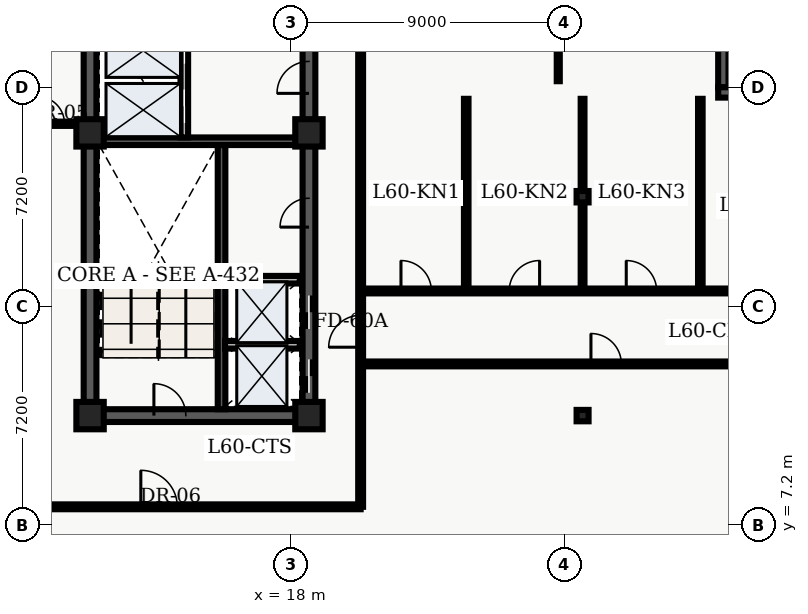
"""IFC4 building model, lengths in metres.
Left out: names, types, materials, properties, quantities, classifications, styles, units other than length and angle.
Written with IfcOpenShell. Run it as: python <this file> out.ifc"""

import sys

from ifc_helpers import new_model, entity, si_unit, converted_unit, direction, frame, origin_with_axes, origin_2d_with_axis, place, context, subcontext, project, spatial, polyline, rectangle, i_section, outline, extrude, element, fill, save


model = new_model("IFC4")
c1 = context("Model", 3, precision=1e-05, world=origin_with_axes(), true_north=direction((0.0, 1.0)))
c2 = subcontext(c1, "Body", "Model", "MODEL_VIEW")
j1 = project(units=[si_unit("LENGTHUNIT", "METRE"), converted_unit("PLANEANGLEUNIT", "DEGREE", entity("IfcPlaneAngleMeasure", 0.017), si_unit("PLANEANGLEUNIT", "RADIAN"), dimensions=[0, 0, 0, 0, 0, 0, 0])], contexts=[c1])
p1 = place(None, origin_with_axes())
s1 = spatial("IfcSite", under=j1, at=p1, CompositionType="ELEMENT")
p2 = place(p1, origin_with_axes())
s2 = spatial("IfcBuilding", under=s1, at=p2, CompositionType="ELEMENT")
p3 = place(p2, frame((0.0, 0.0, 244.2), z_axis=(0.0, 0.0, 1.0), x_axis=(1.0, 0.0, 0.0)))
s3 = spatial("IfcBuildingStorey", under=s2, at=p3, CompositionType="ELEMENT", Elevation=244.2)
p4 = place(p3, frame((11.4, 10.8, 0.0), z_axis=(0.0, 0.0, 1.0), x_axis=(0.0, 1.0, 0.0)))
e1 = element("IfcWall", 1, at=p4, inside=s3, PredefinedType="SHEAR", context=c2, shape_type="SweptSolid", body=[
    extrude(outline(polyline([(0.0, -0.21), (27.0, -0.21), (27.0, 0.21), (0.0, 0.21), (0.0, -0.21)])), origin_with_axes(), (0.0, 0.0, 1.0), 3.6),
])
p5 = place(p3, frame((11.4, 10.8, 0.0), z_axis=(0.0, 0.0, 1.0), x_axis=(1.0, 0.0, 0.0)))
e2 = element("IfcWall", 2, at=p5, inside=s3, PredefinedType="SHEAR", context=c2, shape_type="SweptSolid", body=[
    extrude(outline(polyline([(0.0, -0.21), (7.2, -0.21), (7.2, 0.21), (0.0, 0.21), (0.0, -0.21)])), origin_with_axes(), (0.0, 0.0, 1.0), 3.6),
])
p6 = place(p5, frame((2.625, 0.0, 0.0), z_axis=(0.0, 0.0, 1.0), x_axis=(1.0, 0.0, 0.0)))
e3 = element("IfcOpeningElement", 3, at=p6, cuts=e2, PredefinedType="OPENING", context=c2, shape_type="SweptSolid", body=[
    extrude(rectangle(XDim=1.05, YDim=0.44, at=origin_2d_with_axis()), origin_with_axes(), (0.0, 0.0, 1.0), 2.15),
])
p7 = place(p3, frame((18.6, 10.8, 0.0), z_axis=(0.0, 0.0, 1.0), x_axis=(0.0, 1.0, 0.0)))
e4 = element("IfcWall", 4, at=p7, inside=s3, PredefinedType="SHEAR", context=c2, shape_type="SweptSolid", body=[
    extrude(outline(polyline([(0.0, -0.21), (13.5, -0.21), (13.5, 0.21), (0.0, 0.21), (0.0, -0.21)])), origin_with_axes(), (0.0, 0.0, 1.0), 3.6),
])
p8 = place(p7, frame((1.3, 0.0, 0.0), z_axis=(0.0, 0.0, 1.0), x_axis=(1.0, 0.0, 0.0)))
e5 = element("IfcOpeningElement", 5, at=p8, cuts=e4, PredefinedType="OPENING", context=c2, shape_type="SweptSolid", body=[
    extrude(rectangle(XDim=1.1, YDim=0.44, at=origin_2d_with_axis()), origin_with_axes(), (0.0, 0.0, 1.0), 2.15),
])
p9 = place(p7, frame((3.4, 0.0, 0.0), z_axis=(0.0, 0.0, 1.0), x_axis=(1.0, 0.0, 0.0)))
e6 = element("IfcOpeningElement", 6, at=p9, cuts=e4, PredefinedType="OPENING", context=c2, shape_type="SweptSolid", body=[
    extrude(rectangle(XDim=1.1, YDim=0.44, at=origin_2d_with_axis()), origin_with_axes(), (0.0, 0.0, 1.0), 2.15),
])
p10 = place(p7, frame((11.125, 0.0, 0.0), z_axis=(0.0, 0.0, 1.0), x_axis=(1.0, 0.0, 0.0)))
e7 = element("IfcOpeningElement", 7, at=p10, cuts=e4, PredefinedType="OPENING", context=c2, shape_type="SweptSolid", body=[
    extrude(rectangle(XDim=1.05, YDim=0.44, at=origin_2d_with_axis()), origin_with_axes(), (0.0, 0.0, 1.0), 2.15),
])
p11 = place(p7, frame((6.675, 0.0, 0.0), z_axis=(0.0, 0.0, 1.0), x_axis=(1.0, 0.0, 0.0)))
e8 = element("IfcOpeningElement", 8, at=p11, cuts=e4, PredefinedType="OPENING", context=c2, shape_type="SweptSolid", body=[
    extrude(rectangle(XDim=0.95, YDim=0.44, at=origin_2d_with_axis()), origin_with_axes(), (0.0, 0.0, 1.0), 2.15),
])
p12 = place(p3, frame((15.725, 11.01, 0.0), z_axis=(0.0, 0.0, 1.0), x_axis=(0.0, 1.0, 0.0)))
e9 = element("IfcWall", 9, at=p12, inside=s3, PredefinedType="SHEAR", context=c2, shape_type="SweptSolid", body=[
    extrude(outline(polyline([(0.0, -0.125), (8.69, -0.125), (8.69, 0.125), (0.0, 0.125), (0.0, -0.125)])), origin_with_axes(), (0.0, 0.0, 1.0), 3.6),
])
p13 = place(p3, frame((11.61, 19.825, 0.0), z_axis=(0.0, 0.0, 1.0), x_axis=(1.0, 0.0, 0.0)))
e10 = element("IfcWall", 10, at=p13, inside=s3, PredefinedType="SHEAR", context=c2, shape_type="SweptSolid", body=[
    extrude(outline(polyline([(0.0, -0.125), (6.78, -0.125), (6.78, 0.125), (0.0, 0.125), (0.0, -0.125)])), origin_with_axes(), (0.0, 0.0, 1.0), 3.6),
])
p14 = place(p3, frame((14.5, 19.95, 0.0), z_axis=(0.0, 0.0, 1.0), x_axis=(0.0, 1.0, 0.0)))
e11 = element("IfcWall", 11, at=p14, inside=s3, PredefinedType="SOLIDWALL", context=c2, shape_type="SweptSolid", body=[
    extrude(outline(polyline([(0.0, -0.125), (6.25, -0.125), (6.25, 0.125), (0.0, 0.125), (0.0, -0.125)])), origin_with_axes(), (0.0, 0.0, 1.0), 2.64),
])
p15 = place(p14, frame((1.025, 0.0, 0.0), z_axis=(0.0, 0.0, 1.0), x_axis=(1.0, 0.0, 0.0)))
e12 = element("IfcOpeningElement", 12, at=p15, cuts=e11, PredefinedType="OPENING", context=c2, shape_type="SweptSolid", body=[
    extrude(rectangle(XDim=1.1, YDim=0.27, at=origin_2d_with_axis()), origin_with_axes(), (0.0, 0.0, 1.0), 2.15),
])
p16 = place(p14, frame((2.975, 0.0, 0.0), z_axis=(0.0, 0.0, 1.0), x_axis=(1.0, 0.0, 0.0)))
e13 = element("IfcOpeningElement", 13, at=p16, cuts=e11, PredefinedType="OPENING", context=c2, shape_type="SweptSolid", body=[
    extrude(rectangle(XDim=1.1, YDim=0.27, at=origin_2d_with_axis()), origin_with_axes(), (0.0, 0.0, 1.0), 2.15),
])
p17 = place(p14, frame((5.425, 0.0, 0.0), z_axis=(0.0, 0.0, 1.0), x_axis=(1.0, 0.0, 0.0)))
e14 = element("IfcOpeningElement", 14, at=p17, cuts=e11, PredefinedType="OPENING", context=c2, shape_type="SweptSolid", body=[
    extrude(rectangle(XDim=1.2, YDim=0.27, at=origin_2d_with_axis()), origin_with_axes(), (0.0, 0.0, 1.0), 2.15),
])
for number, where, z_axis, x_axis in (
    (15, (11.4, 10.8, 0.0), (0.0, 0.0, 1.0), (1.0, 0.0, 0.0)),
    (16, (11.4, 20.1, 0.0), (0.0, 0.0, 1.0), (1.0, 0.0, 0.0)),
    (17, (18.6, 10.8, 0.0), (0.0, 0.0, 1.0), (1.0, 0.0, 0.0)),
    (18, (18.6, 20.1, 0.0), (0.0, 0.0, 1.0), (1.0, 0.0, 0.0)),
):
    element("IfcColumn", number, at=place(p3, frame(where, z_axis=z_axis, x_axis=x_axis)), inside=s3, PredefinedType="COLUMN", context=c2, shape_type="SweptSolid", body=[
        extrude(rectangle(XDim=0.9, YDim=0.9, at=origin_2d_with_axis()), origin_with_axes(), (0.0, 0.0, 1.0), 3.9),
    ])
for number, where, z_axis, x_axis in (
    (19, (27.6, 10.8, 0.0), (0.0, 0.0, 1.0), (1.0, 0.0, 0.0)),
    (20, (27.6, 18.0, 0.0), (0.0, 0.0, 1.0), (1.0, 0.0, 0.0)),
):
    element("IfcColumn", number, at=place(p3, frame(where, z_axis=z_axis, x_axis=x_axis)), inside=s3, PredefinedType="COLUMN", context=c2, shape_type="SweptSolid", body=[
        extrude(i_section(OverallWidth=0.394, OverallDepth=0.375, WebThickness=0.017, FlangeThickness=0.028, FilletRadius=0.02, at=origin_2d_with_axis()), origin_with_axes(), (0.0, 0.0, 1.0), 3.9),
    ])
for number, where, z_axis, x_axis in (
    (21, (15.84, 13.13, 0.0), (0.0, 0.0, 1.0), (1.0, 0.0, 0.0)),
    (22, (15.84, 15.27, 0.0), (0.0, 0.0, 1.0), (1.0, 0.0, 0.0)),
):
    element("IfcWall", number, at=place(p3, frame(where, z_axis=z_axis, x_axis=x_axis)), inside=s3, PredefinedType="SOLIDWALL", context=c2, shape_type="SweptSolid", body=[
        extrude(outline(polyline([(0.0, -0.125), (2.46, -0.125), (2.46, 0.125), (0.0, 0.125), (0.0, -0.125)])), origin_with_axes(), (0.0, 0.0, 1.0), 2.64),
    ])
p18 = place(p3, frame((9.52, 20.4, 0.0), z_axis=(0.0, 0.0, 1.0), x_axis=(1.0, 0.0, 0.0)))
e23 = element("IfcWall", 23, at=p18, inside=s3, PredefinedType="PARTITIONING", context=c2, shape_type="SweptSolid", body=[
    extrude(outline(polyline([(0.0, -0.07), (1.58, -0.07), (1.58, 0.07), (0.0, 0.07), (0.0, -0.07)])), origin_with_axes(), (0.0, 0.0, 1.0), 2.64),
])
p19 = place(p18, frame((0.59, 0.0, 0.0), z_axis=(0.0, 0.0, 1.0), x_axis=(1.0, 0.0, 0.0)))
e24 = element("IfcOpeningElement", 24, at=p19, cuts=e23, PredefinedType="OPENING", context=c2, shape_type="SweptSolid", body=[
    extrude(rectangle(XDim=0.9, YDim=0.16, at=origin_2d_with_axis()), origin_with_axes(), (0.0, 0.0, 1.0), 2.15),
])
p20 = place(p3, frame((7.1, 7.8, 0.0), z_axis=(0.0, 0.0, 1.0), x_axis=(1.0, 0.0, 0.0)))
e25 = element("IfcWall", 25, at=p20, inside=s3, PredefinedType="PARTITIONING", context=c2, shape_type="SweptSolid", body=[
    extrude(outline(polyline([(0.0, -0.08), (13.2, -0.08), (13.2, 0.08), (0.0, 0.08), (0.0, -0.08)])), origin_with_axes(), (0.0, 0.0, 1.0), 2.64),
])
p21 = place(p20, frame((6.57, 0.0, 0.0), z_axis=(0.0, 0.0, 1.0), x_axis=(1.0, 0.0, 0.0)))
e26 = element("IfcOpeningElement", 26, at=p21, cuts=e25, PredefinedType="OPENING", context=c2, shape_type="SweptSolid", body=[
    extrude(rectangle(XDim=1.2, YDim=0.18, at=origin_2d_with_axis()), origin_with_axes(), (0.0, 0.0, 1.0), 2.2),
])
p22 = place(p3, frame((20.3, 7.8, 0.0), z_axis=(0.0, 0.0, 1.0), x_axis=(0.0, 1.0, 0.0)))
e27 = element("IfcWall", 27, at=p22, inside=s3, PredefinedType="PARTITIONING", context=c2, shape_type="SweptSolid", body=[
    extrude(outline(polyline([(0.0, -0.08), (32.7, -0.08), (32.7, 0.08), (0.0, 0.08), (0.0, -0.08)])), origin_with_axes(), (0.0, 0.0, 1.0), 2.64),
])
p23 = place(p22, frame((17.794, 0.0, 0.0), z_axis=(0.0, 0.0, 1.0), x_axis=(1.0, 0.0, 0.0)))
e28 = element("IfcOpeningElement", 28, at=p23, cuts=e27, PredefinedType="OPENING", context=c2, shape_type="SweptSolid", body=[
    extrude(rectangle(XDim=1.0, YDim=0.18, at=origin_2d_with_axis()), origin_with_axes(), (0.0, 0.0, 1.0), 2.15),
])
p24 = place(p22, frame((22.145, 0.0, 0.0), z_axis=(0.0, 0.0, 1.0), x_axis=(1.0, 0.0, 0.0)))
e29 = element("IfcOpeningElement", 29, at=p24, cuts=e27, PredefinedType="OPENING", context=c2, shape_type="SweptSolid", body=[
    extrude(rectangle(XDim=1.0, YDim=0.18, at=origin_2d_with_axis()), origin_with_axes(), (0.0, 0.0, 1.0), 2.15),
])
p25 = place(p22, frame((26.855, 0.0, 0.0), z_axis=(0.0, 0.0, 1.0), x_axis=(1.0, 0.0, 0.0)))
e30 = element("IfcOpeningElement", 30, at=p25, cuts=e27, PredefinedType="OPENING", context=c2, shape_type="SweptSolid", body=[
    extrude(rectangle(XDim=1.0, YDim=0.18, at=origin_2d_with_axis()), origin_with_axes(), (0.0, 0.0, 1.0), 2.15),
])
p26 = place(p22, frame((5.775, 0.0, 0.0), z_axis=(0.0, 0.0, 1.0), x_axis=(1.0, 0.0, 0.0)))
e31 = element("IfcOpeningElement", 31, at=p26, cuts=e27, PredefinedType="OPENING", context=c2, shape_type="SweptSolid", body=[
    extrude(rectangle(XDim=1.05, YDim=0.18, at=origin_2d_with_axis()), origin_with_axes(), (0.0, 0.0, 1.0), 2.15),
])
p27 = place(p3, frame((26.8, 21.8, 0.0), z_axis=(0.0, 0.0, 1.0), x_axis=(0.0, 1.0, 0.0)))
e32 = element("IfcWall", 32, at=p27, inside=s3, PredefinedType="PARTITIONING", context=c2, shape_type="SweptSolid", body=[
    extrude(outline(polyline([(0.0, -0.05), (18.5, -0.05), (18.5, 0.05), (0.0, 0.05), (0.0, -0.05)])), origin_with_axes(), (0.0, 0.0, 1.0), 2.64),
])
p28 = place(p27, frame((2.544, 0.0, 0.0), z_axis=(0.0, 0.0, 1.0), x_axis=(1.0, 0.0, 0.0)))
e33 = element("IfcOpeningElement", 33, at=p28, cuts=e32, PredefinedType="OPENING", context=c2, shape_type="SweptSolid", body=[
    extrude(rectangle(XDim=0.95, YDim=0.12, at=origin_2d_with_axis()), origin_with_axes(), (0.0, 0.0, 1.0), 2.15),
])
p29 = place(p27, frame((8.145, 0.0, 0.0), z_axis=(0.0, 0.0, 1.0), x_axis=(1.0, 0.0, 0.0)))
e34 = element("IfcOpeningElement", 34, at=p29, cuts=e32, PredefinedType="OPENING", context=c2, shape_type="SweptSolid", body=[
    extrude(rectangle(XDim=0.95, YDim=0.12, at=origin_2d_with_axis()), origin_with_axes(), (0.0, 0.0, 1.0), 2.15),
])
p30 = place(p27, frame((12.855, 0.0, 0.0), z_axis=(0.0, 0.0, 1.0), x_axis=(1.0, 0.0, 0.0)))
e35 = element("IfcOpeningElement", 35, at=p30, cuts=e32, PredefinedType="OPENING", context=c2, shape_type="SweptSolid", body=[
    extrude(rectangle(XDim=0.95, YDim=0.12, at=origin_2d_with_axis()), origin_with_axes(), (0.0, 0.0, 1.0), 2.15),
])
p31 = place(p27, frame((16.574, 0.0, 0.0), z_axis=(0.0, 0.0, 1.0), x_axis=(1.0, 0.0, 0.0)))
e36 = element("IfcOpeningElement", 36, at=p31, cuts=e32, PredefinedType="OPENING", context=c2, shape_type="SweptSolid", body=[
    extrude(rectangle(XDim=0.95, YDim=0.12, at=origin_2d_with_axis()), origin_with_axes(), (0.0, 0.0, 1.0), 2.15),
])
p32 = place(p3, frame((20.3, 12.5, 0.0), z_axis=(0.0, 0.0, 1.0), x_axis=(1.0, 0.0, 0.0)))
e37 = element("IfcWall", 37, at=p32, inside=s3, PredefinedType="PARTITIONING", context=c2, shape_type="SweptSolid", body=[
    extrude(outline(polyline([(0.0, -0.08), (16.05, -0.08), (16.05, 0.08), (0.0, 0.08), (0.0, -0.08)])), origin_with_axes(), (0.0, 0.0, 1.0), 2.64),
])
p33 = place(p32, frame((8.075, 0.0, 0.0), z_axis=(0.0, 0.0, 1.0), x_axis=(1.0, 0.0, 0.0)))
e38 = element("IfcOpeningElement", 38, at=p33, cuts=e37, PredefinedType="OPENING", context=c2, shape_type="SweptSolid", body=[
    extrude(rectangle(XDim=1.0, YDim=0.18, at=origin_2d_with_axis()), origin_with_axes(), (0.0, 0.0, 1.0), 2.15),
])
p34 = place(p3, frame((20.3, 14.9, 0.0), z_axis=(0.0, 0.0, 1.0), x_axis=(1.0, 0.0, 0.0)))
e39 = element("IfcWall", 39, at=p34, inside=s3, PredefinedType="PARTITIONING", context=c2, shape_type="SweptSolid", body=[
    extrude(outline(polyline([(0.0, -0.08), (16.05, -0.08), (16.05, 0.08), (0.0, 0.08), (0.0, -0.08)])), origin_with_axes(), (0.0, 0.0, 1.0), 2.64),
])
p35 = place(p34, frame((1.827, 0.0, 0.0), z_axis=(0.0, 0.0, 1.0), x_axis=(1.0, 0.0, 0.0)))
e40 = element("IfcOpeningElement", 40, at=p35, cuts=e39, PredefinedType="OPENING", context=c2, shape_type="SweptSolid", body=[
    extrude(rectangle(XDim=1.0, YDim=0.18, at=origin_2d_with_axis()), origin_with_axes(), (0.0, 0.0, 1.0), 2.15),
])
p36 = place(p34, frame((5.386, 0.0, 0.0), z_axis=(0.0, 0.0, 1.0), x_axis=(1.0, 0.0, 0.0)))
e41 = element("IfcOpeningElement", 41, at=p36, cuts=e39, PredefinedType="OPENING", context=c2, shape_type="SweptSolid", body=[
    extrude(rectangle(XDim=1.0, YDim=0.18, at=origin_2d_with_axis()), origin_with_axes(), (0.0, 0.0, 1.0), 2.15),
])
p37 = place(p34, frame((9.236, 0.0, 0.0), z_axis=(0.0, 0.0, 1.0), x_axis=(1.0, 0.0, 0.0)))
e42 = element("IfcOpeningElement", 42, at=p37, cuts=e39, PredefinedType="OPENING", context=c2, shape_type="SweptSolid", body=[
    extrude(rectangle(XDim=1.0, YDim=0.18, at=origin_2d_with_axis()), origin_with_axes(), (0.0, 0.0, 1.0), 2.15),
])
p38 = place(p34, frame((13.572, 0.0, 0.0), z_axis=(0.0, 0.0, 1.0), x_axis=(1.0, 0.0, 0.0)))
e43 = element("IfcOpeningElement", 43, at=p38, cuts=e39, PredefinedType="OPENING", context=c2, shape_type="SweptSolid", body=[
    extrude(rectangle(XDim=1.0, YDim=0.18, at=origin_2d_with_axis()), origin_with_axes(), (0.0, 0.0, 1.0), 2.15),
])
p39 = place(p3, frame((23.773, 15.02, 0.0), z_axis=(0.0, 0.0, 1.0), x_axis=(0.0, 1.0, 0.0)))
e44 = element("IfcWall", 44, at=p39, inside=s3, PredefinedType="PARTITIONING", context=c2, shape_type="SweptSolid", body=[
    extrude(outline(polyline([(0.0, -0.075), (6.2, -0.075), (6.2, 0.075), (0.0, 0.075), (0.0, -0.075)])), origin_with_axes(), (0.0, 0.0, 1.0), 2.64),
])
p40 = place(p3, frame((27.6, 15.02, 0.0), z_axis=(0.0, 0.0, 1.0), x_axis=(0.0, 1.0, 0.0)))
e45 = element("IfcWall", 45, at=p40, inside=s3, PredefinedType="PARTITIONING", context=c2, shape_type="SweptSolid", body=[
    extrude(outline(polyline([(0.0, -0.062), (6.2, -0.062), (6.2, 0.062), (0.0, 0.062), (0.0, -0.062)])), origin_with_axes(), (0.0, 0.0, 1.0), 2.64),
])
p41 = place(p3, frame((31.473, 15.02, 0.0), z_axis=(0.0, 0.0, 1.0), x_axis=(0.0, 1.0, 0.0)))
e46 = element("IfcWall", 46, at=p41, inside=s3, PredefinedType="PARTITIONING", context=c2, shape_type="SweptSolid", body=[
    extrude(outline(polyline([(0.0, -0.075), (6.2, -0.075), (6.2, 0.075), (0.0, 0.075), (0.0, -0.075)])), origin_with_axes(), (0.0, 0.0, 1.0), 2.64),
])
p42 = place(p3, frame((32.23, 41.82, 0.0), z_axis=(0.0, 0.0, 1.0), x_axis=(0.0, -1.0, 0.0)))
e47 = element("IfcWall", 47, at=p42, inside=s3, PredefinedType="SOLIDWALL", context=c2, shape_type="SweptSolid", body=[
    extrude(outline(polyline([(0.0, -0.17), (20.22, -0.17), (20.22, 0.17), (0.0, 0.17), (0.0, -0.17)])), origin_with_axes(), (0.0, 0.0, 1.0), 3.6),
])
p43 = place(p42, frame((2.978, 0.0, 0.45), z_axis=(0.0, 0.0, 1.0), x_axis=(1.0, 0.0, 0.0)))
e48 = element("IfcOpeningElement", 48, at=p43, cuts=e47, PredefinedType="OPENING", context=c2, shape_type="SweptSolid", body=[
    extrude(rectangle(XDim=1.8, YDim=0.36, at=origin_2d_with_axis()), origin_with_axes(), (0.0, 0.0, 1.0), 2.1),
])
p44 = place(p42, frame((7.282, 0.0, 0.45), z_axis=(0.0, 0.0, 1.0), x_axis=(1.0, 0.0, 0.0)))
e49 = element("IfcOpeningElement", 49, at=p44, cuts=e47, PredefinedType="OPENING", context=c2, shape_type="SweptSolid", body=[
    extrude(rectangle(XDim=1.8, YDim=0.36, at=origin_2d_with_axis()), origin_with_axes(), (0.0, 0.0, 1.0), 2.1),
])
p45 = place(p42, frame((12.487, 0.0, 0.45), z_axis=(0.0, 0.0, 1.0), x_axis=(1.0, 0.0, 0.0)))
e50 = element("IfcOpeningElement", 50, at=p45, cuts=e47, PredefinedType="OPENING", context=c2, shape_type="SweptSolid", body=[
    extrude(rectangle(XDim=1.8, YDim=0.36, at=origin_2d_with_axis()), origin_with_axes(), (0.0, 0.0, 1.0), 2.1),
])
p46 = place(p42, frame((17.243, 0.0, 0.45), z_axis=(0.0, 0.0, 1.0), x_axis=(1.0, 0.0, 0.0)))
e51 = element("IfcOpeningElement", 51, at=p46, cuts=e47, PredefinedType="OPENING", context=c2, shape_type="SweptSolid", body=[
    extrude(rectangle(XDim=1.8, YDim=0.36, at=origin_2d_with_axis()), origin_with_axes(), (0.0, 0.0, 1.0), 2.1),
])
p47 = place(p3, frame((32.06, 21.43, 0.0), z_axis=(0.0, 0.0, 1.0), x_axis=(1.0, 0.0, 0.0)))
e52 = element("IfcWall", 52, at=p47, inside=s3, PredefinedType="SOLIDWALL", context=c2, shape_type="SweptSolid", body=[
    extrude(outline(polyline([(0.0, -0.17), (3.94, -0.17), (3.94, 0.17), (0.0, 0.17), (0.0, -0.17)])), origin_with_axes(), (0.0, 0.0, 1.0), 3.6),
])
p48 = place(p7, frame((1.3, 0.0, 0.0), z_axis=(0.0, 0.0, 1.0), x_axis=(1.0, 0.0, 0.0)))
e53 = element("IfcDoor", 53, at=p48, inside=s3, OperationType="SLIDING_TO_LEFT", PredefinedType="DOOR", context=c2, shape_type="SweptSolid", body=[
    extrude(rectangle(XDim=1.1, YDim=0.09, at=origin_2d_with_axis()), origin_with_axes(), (0.0, 0.0, 1.0), 2.15),
])
fill(e5, e53)
p49 = place(p7, frame((3.4, 0.0, 0.0), z_axis=(0.0, 0.0, 1.0), x_axis=(1.0, 0.0, 0.0)))
e54 = element("IfcDoor", 54, at=p49, inside=s3, OperationType="SLIDING_TO_RIGHT", PredefinedType="DOOR", context=c2, shape_type="SweptSolid", body=[
    extrude(rectangle(XDim=1.1, YDim=0.09, at=origin_2d_with_axis()), origin_with_axes(), (0.0, 0.0, 1.0), 2.15),
])
fill(e6, e54)
p50 = place(p14, frame((1.025, 0.0, 0.0), z_axis=(0.0, 0.0, 1.0), x_axis=(1.0, 0.0, 0.0)))
e55 = element("IfcDoor", 55, at=p50, inside=s3, OperationType="SLIDING_TO_LEFT", PredefinedType="DOOR", context=c2, shape_type="SweptSolid", body=[
    extrude(rectangle(XDim=1.1, YDim=0.09, at=origin_2d_with_axis()), origin_with_axes(), (0.0, 0.0, 1.0), 2.15),
])
fill(e12, e55)
p51 = place(p14, frame((2.975, 0.0, 0.0), z_axis=(0.0, 0.0, 1.0), x_axis=(1.0, 0.0, 0.0)))
e56 = element("IfcDoor", 56, at=p51, inside=s3, OperationType="SLIDING_TO_RIGHT", PredefinedType="DOOR", context=c2, shape_type="SweptSolid", body=[
    extrude(rectangle(XDim=1.1, YDim=0.09, at=origin_2d_with_axis()), origin_with_axes(), (0.0, 0.0, 1.0), 2.15),
])
fill(e13, e56)
p52 = place(p5, frame((2.625, 0.0, 0.0), z_axis=(0.0, 0.0, 1.0), x_axis=(1.0, 0.0, 0.0)))
e57 = element("IfcDoor", 57, at=p52, inside=s3, OperationType="SINGLE_SWING_LEFT", PredefinedType="DOOR", context=c2, shape_type="SweptSolid", body=[
    extrude(rectangle(XDim=1.05, YDim=0.09, at=origin_2d_with_axis()), origin_with_axes(), (0.0, 0.0, 1.0), 2.15),
])
fill(e3, e57)
p53 = place(p7, frame((11.125, 0.0, 0.0), z_axis=(0.0, 0.0, 1.0), x_axis=(1.0, 0.0, 0.0)))
e58 = element("IfcDoor", 58, at=p53, inside=s3, OperationType="SINGLE_SWING_LEFT", PredefinedType="DOOR", context=c2, shape_type="SweptSolid", body=[
    extrude(rectangle(XDim=1.05, YDim=0.09, at=origin_2d_with_axis()), origin_with_axes(), (0.0, 0.0, 1.0), 2.15),
])
fill(e7, e58)
p54 = place(p7, frame((6.675, 0.0, 0.0), z_axis=(0.0, 0.0, 1.0), x_axis=(1.0, 0.0, 0.0)))
e59 = element("IfcDoor", 59, at=p54, inside=s3, OperationType="SINGLE_SWING_LEFT", PredefinedType="DOOR", context=c2, shape_type="SweptSolid", body=[
    extrude(rectangle(XDim=0.95, YDim=0.09, at=origin_2d_with_axis()), origin_with_axes(), (0.0, 0.0, 1.0), 2.15),
])
fill(e8, e59)
p55 = place(p18, frame((0.59, 0.0, 0.0), z_axis=(0.0, 0.0, 1.0), x_axis=(1.0, 0.0, 0.0)))
e60 = element("IfcDoor", 60, at=p55, inside=s3, OperationType="SINGLE_SWING_LEFT", PredefinedType="DOOR", context=c2, shape_type="SweptSolid", body=[
    extrude(rectangle(XDim=0.9, YDim=0.084, at=origin_2d_with_axis()), origin_with_axes(), (0.0, 0.0, 1.0), 2.15),
])
fill(e24, e60)
p56 = place(p20, frame((6.57, 0.0, 0.0), z_axis=(0.0, 0.0, 1.0), x_axis=(1.0, 0.0, 0.0)))
e61 = element("IfcDoor", 61, at=p56, inside=s3, OperationType="SINGLE_SWING_LEFT", PredefinedType="DOOR", context=c2, shape_type="SweptSolid", body=[
    extrude(rectangle(XDim=1.2, YDim=0.09, at=origin_2d_with_axis()), origin_with_axes(), (0.0, 0.0, 1.0), 2.2),
])
fill(e26, e61)
p57 = place(p22, frame((5.775, 0.0, 0.0), z_axis=(0.0, 0.0, 1.0), x_axis=(1.0, 0.0, 0.0)))
e62 = element("IfcDoor", 62, at=p57, inside=s3, OperationType="SINGLE_SWING_LEFT", PredefinedType="DOOR", context=c2, shape_type="SweptSolid", body=[
    extrude(rectangle(XDim=1.05, YDim=0.09, at=origin_2d_with_axis()), origin_with_axes(), (0.0, 0.0, 1.0), 2.15),
])
fill(e31, e62)
p58 = place(p32, frame((8.075, 0.0, 0.0), z_axis=(0.0, 0.0, 1.0), x_axis=(1.0, 0.0, 0.0)))
e63 = element("IfcDoor", 63, at=p58, inside=s3, OperationType="SINGLE_SWING_LEFT", PredefinedType="DOOR", context=c2, shape_type="SweptSolid", body=[
    extrude(rectangle(XDim=1.0, YDim=0.09, at=origin_2d_with_axis()), origin_with_axes(), (0.0, 0.0, 1.0), 2.15),
])
fill(e38, e63)
p59 = place(p34, frame((1.827, 0.0, 0.0), z_axis=(0.0, 0.0, 1.0), x_axis=(1.0, 0.0, 0.0)))
e64 = element("IfcDoor", 64, at=p59, inside=s3, OperationType="SINGLE_SWING_LEFT", PredefinedType="DOOR", context=c2, shape_type="SweptSolid", body=[
    extrude(rectangle(XDim=1.0, YDim=0.09, at=origin_2d_with_axis()), origin_with_axes(), (0.0, 0.0, 1.0), 2.15),
])
fill(e40, e64)
p60 = place(p34, frame((5.386, 0.0, 0.0), z_axis=(0.0, 0.0, 1.0), x_axis=(1.0, 0.0, 0.0)))
e65 = element("IfcDoor", 65, at=p60, inside=s3, OperationType="SINGLE_SWING_RIGHT", PredefinedType="DOOR", context=c2, shape_type="SweptSolid", body=[
    extrude(rectangle(XDim=1.0, YDim=0.09, at=origin_2d_with_axis()), origin_with_axes(), (0.0, 0.0, 1.0), 2.15),
])
fill(e41, e65)
p61 = place(p34, frame((9.236, 0.0, 0.0), z_axis=(0.0, 0.0, 1.0), x_axis=(1.0, 0.0, 0.0)))
e66 = element("IfcDoor", 66, at=p61, inside=s3, OperationType="SINGLE_SWING_LEFT", PredefinedType="DOOR", context=c2, shape_type="SweptSolid", body=[
    extrude(rectangle(XDim=1.0, YDim=0.09, at=origin_2d_with_axis()), origin_with_axes(), (0.0, 0.0, 1.0), 2.15),
])
fill(e42, e66)
save(model, sys.argv[1])
